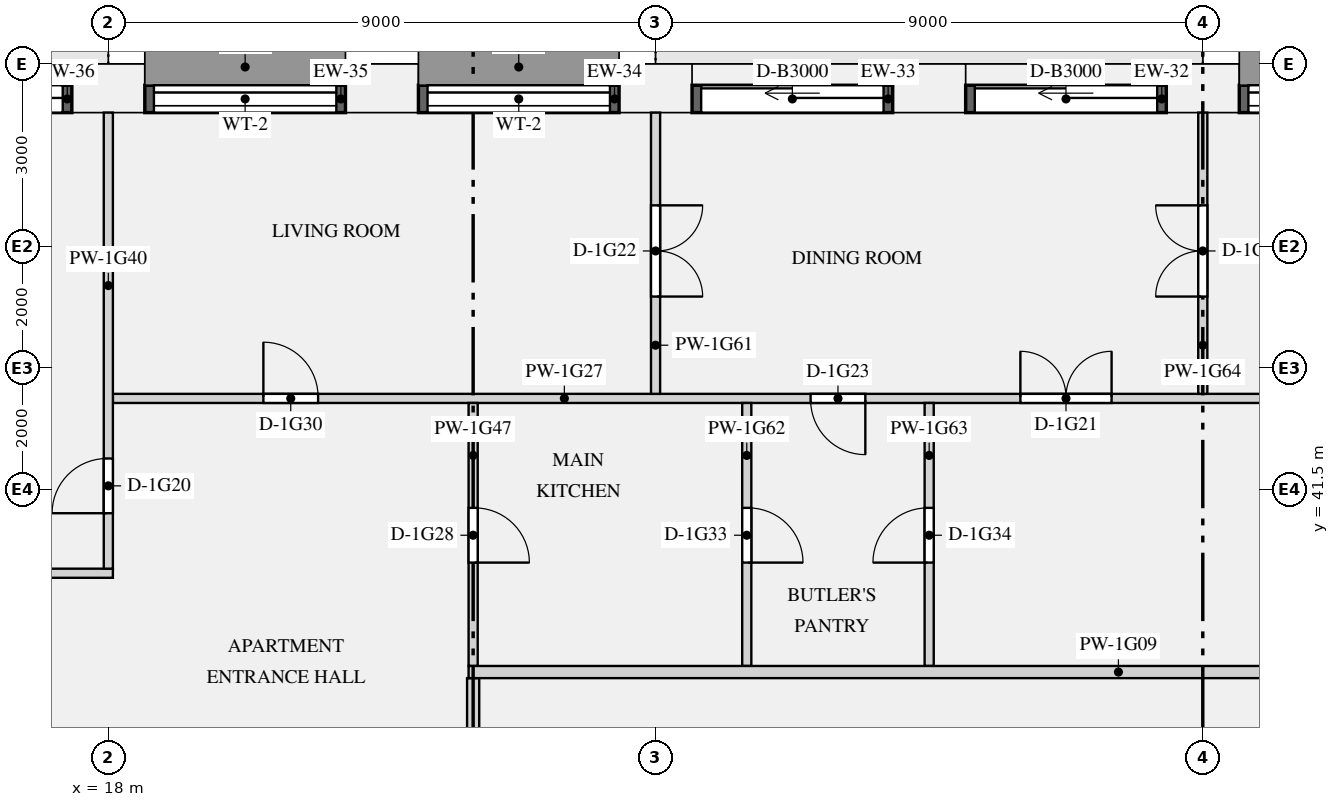
"""IFC4 building model, lengths in metres.
Left out: names, types, materials, properties, quantities, classifications, styles, units other than length and angle.
Written with IfcOpenShell. Run it as: python <this file> out.ifc"""

import sys

from ifc_helpers import new_model, si_unit, direction, frame, frame_2d, origin, origin_2d, place, context, subcontext, project, spatial, rectangle, extrude, element, fill, save


model = new_model("IFC4")
c1 = context("Model", 3, precision=1e-05, world=origin(), true_north=direction((0.0, 1.0)))
c2 = subcontext(c1, "Body", "Model", "MODEL_VIEW")
j1 = project(units=[si_unit("LENGTHUNIT", "METRE"), si_unit("PLANEANGLEUNIT", "RADIAN")], contexts=[c1])
p1 = place(None, origin())
s1 = spatial("IfcSite", under=j1, at=p1, CompositionType="ELEMENT")
p2 = place(p1, origin())
s2 = spatial("IfcBuilding", under=s1, at=p2, CompositionType="ELEMENT")
p3 = place(p2, frame((0.0, 0.0, 69.9)))
s3 = spatial("IfcBuildingStorey", under=s2, at=p3, CompositionType="ELEMENT", Elevation=69.9)
for number, where, z_axis, x_axis in (
    (1, (36.0, 48.1, 0.0), (0.0, 0.0, 1.0), (-1.0, 0.0, 0.0)),
    (2, (31.5, 48.1, 0.0), (0.0, 0.0, 1.0), (-1.0, 0.0, 0.0)),
    (3, (27.0, 48.1, 0.0), (0.0, 0.0, 1.0), (-1.0, 0.0, 0.0)),
    (4, (22.5, 48.1, 0.0), (0.0, 0.0, 1.0), (-1.0, 0.0, 0.0)),
    (5, (18.0, 48.1, 0.0), (0.0, 0.0, 1.0), (-1.0, 0.0, 0.0)),
):
    element("IfcColumn", number, at=place(p3, frame(where, z_axis=z_axis, x_axis=x_axis)), inside=s3, PredefinedType="USERDEFINED", context=c2, shape_type="SweptSolid", body=[
        extrude(rectangle(XDim=1.2, YDim=0.8, at=origin_2d()), origin(), (0.0, 0.0, 1.0), 2.65),
    ])
p4 = place(p3, frame((39.9, 47.925, 0.9), z_axis=(0.0, 0.0, 1.0), x_axis=(-1.0, 0.0, 0.0)))
e6 = element("IfcWall", 6, at=p4, inside=s3, PredefinedType="SOLIDWALL", context=c2, shape_type="SweptSolid", body=[
    extrude(rectangle(XDim=3.3, YDim=0.45, at=frame_2d((1.65, 0.0))), origin(), (0.0, 0.0, 1.0), 1.75),
])
p5 = place(p4, frame((0.15, 0.0, 0.15)))
e7 = element("IfcOpeningElement", 7, at=p5, cuts=e6, PredefinedType="OPENING", context=c2, shape_type="SweptSolid", body=[
    extrude(rectangle(XDim=3.0, YDim=1.5, at=frame_2d((1.5, 0.75))), frame((0.0, 0.235, 0.0), z_axis=(0.0, -1.0, 0.0), x_axis=(1.0, 0.0, 0.0)), (0.0, 0.0, 1.0), 0.47),
])
p6 = place(p3, frame((35.4, 47.925, 0.0), z_axis=(0.0, 0.0, 1.0), x_axis=(-1.0, 0.0, 0.0)))
e8 = element("IfcWall", 8, at=p6, inside=s3, PredefinedType="SOLIDWALL", context=c2, shape_type="SweptSolid", body=[
    extrude(rectangle(XDim=3.3, YDim=0.45, at=frame_2d((1.65, 0.0))), origin(), (0.0, 0.0, 1.0), 2.65),
])
p7 = place(p6, frame((0.15, 0.0, 0.0)))
e9 = element("IfcOpeningElement", 9, at=p7, cuts=e8, PredefinedType="OPENING", context=c2, shape_type="SweptSolid", body=[
    extrude(rectangle(XDim=3.0, YDim=2.3, at=frame_2d((1.5, 1.15))), frame((0.0, 0.235, 0.0), z_axis=(0.0, -1.0, 0.0), x_axis=(1.0, 0.0, 0.0)), (0.0, 0.0, 1.0), 0.47),
])
p8 = place(p3, frame((30.9, 47.925, 0.0), z_axis=(0.0, 0.0, 1.0), x_axis=(-1.0, 0.0, 0.0)))
e10 = element("IfcWall", 10, at=p8, inside=s3, PredefinedType="SOLIDWALL", context=c2, shape_type="SweptSolid", body=[
    extrude(rectangle(XDim=3.3, YDim=0.45, at=frame_2d((1.65, 0.0))), origin(), (0.0, 0.0, 1.0), 2.65),
])
p9 = place(p8, frame((0.15, 0.0, 0.0)))
e11 = element("IfcOpeningElement", 11, at=p9, cuts=e10, PredefinedType="OPENING", context=c2, shape_type="SweptSolid", body=[
    extrude(rectangle(XDim=3.0, YDim=2.3, at=frame_2d((1.5, 1.15))), frame((0.0, 0.235, 0.0), z_axis=(0.0, -1.0, 0.0), x_axis=(1.0, 0.0, 0.0)), (0.0, 0.0, 1.0), 0.47),
])
p10 = place(p3, frame((26.4, 47.925, 0.9), z_axis=(0.0, 0.0, 1.0), x_axis=(-1.0, 0.0, 0.0)))
e12 = element("IfcWall", 12, at=p10, inside=s3, PredefinedType="SOLIDWALL", context=c2, shape_type="SweptSolid", body=[
    extrude(rectangle(XDim=3.3, YDim=0.45, at=frame_2d((1.65, 0.0))), origin(), (0.0, 0.0, 1.0), 1.75),
])
p11 = place(p10, frame((0.15, 0.0, 0.15)))
e13 = element("IfcOpeningElement", 13, at=p11, cuts=e12, PredefinedType="OPENING", context=c2, shape_type="SweptSolid", body=[
    extrude(rectangle(XDim=3.0, YDim=1.5, at=frame_2d((1.5, 0.75))), frame((0.0, 0.235, 0.0), z_axis=(0.0, -1.0, 0.0), x_axis=(1.0, 0.0, 0.0)), (0.0, 0.0, 1.0), 0.47),
])
p12 = place(p3, frame((21.9, 47.925, 0.9), z_axis=(0.0, 0.0, 1.0), x_axis=(-1.0, 0.0, 0.0)))
e14 = element("IfcWall", 14, at=p12, inside=s3, PredefinedType="SOLIDWALL", context=c2, shape_type="SweptSolid", body=[
    extrude(rectangle(XDim=3.3, YDim=0.45, at=frame_2d((1.65, 0.0))), origin(), (0.0, 0.0, 1.0), 1.75),
])
p13 = place(p12, frame((0.15, 0.0, 0.15)))
e15 = element("IfcOpeningElement", 15, at=p13, cuts=e14, PredefinedType="OPENING", context=c2, shape_type="SweptSolid", body=[
    extrude(rectangle(XDim=3.0, YDim=1.5, at=frame_2d((1.5, 0.75))), frame((0.0, 0.235, 0.0), z_axis=(0.0, -1.0, 0.0), x_axis=(1.0, 0.0, 0.0)), (0.0, 0.0, 1.0), 0.47),
])
p14 = place(p3, frame((17.4, 47.925, 0.0), z_axis=(0.0, 0.0, 1.0), x_axis=(-1.0, 0.0, 0.0)))
e16 = element("IfcWall", 16, at=p14, inside=s3, PredefinedType="SOLIDWALL", context=c2, shape_type="SweptSolid", body=[
    extrude(rectangle(XDim=3.3, YDim=0.45, at=frame_2d((1.65, 0.0))), origin(), (0.0, 0.0, 1.0), 2.65),
])
p15 = place(p14, frame((0.15, 0.0, 0.0)))
e17 = element("IfcOpeningElement", 17, at=p15, cuts=e16, PredefinedType="OPENING", context=c2, shape_type="SweptSolid", body=[
    extrude(rectangle(XDim=3.0, YDim=2.3, at=frame_2d((1.5, 1.15))), frame((0.0, 0.235, 0.0), z_axis=(0.0, -1.0, 0.0), x_axis=(1.0, 0.0, 0.0)), (0.0, 0.0, 1.0), 0.47),
])
p16 = place(p3, frame((23.925, 38.5, 0.0), z_axis=(0.0, 0.0, 1.0), x_axis=(1.0, 0.0, 0.0)))
e18 = element("IfcWall", 18, at=p16, inside=s3, PredefinedType="PARTITIONING", context=c2, shape_type="SweptSolid", body=[
    extrude(rectangle(XDim=24.175, YDim=0.2, at=frame_2d((12.087, 0.0))), origin(), (0.0, 0.0, 1.0), 2.65),
])
p17 = place(p16, frame((21.375, 0.0, 0.0)))
e19 = element("IfcOpeningElement", 19, at=p17, cuts=e18, PredefinedType="OPENING", context=c2, shape_type="SweptSolid", body=[
    extrude(rectangle(XDim=1.1, YDim=2.1, at=frame_2d((0.55, 1.05))), frame((0.0, 0.11, 0.0), z_axis=(0.0, -1.0, 0.0), x_axis=(1.0, 0.0, 0.0)), (0.0, 0.0, 1.0), 0.22),
])
p18 = place(p3, frame((13.425, 40.125, 0.0), z_axis=(0.0, 0.0, 1.0), x_axis=(1.0, 0.0, 0.0)))
e20 = element("IfcWall", 20, at=p18, inside=s3, PredefinedType="PARTITIONING", context=c2, shape_type="SweptSolid", body=[
    extrude(rectangle(XDim=4.65, YDim=0.15, at=frame_2d((2.325, 0.0))), origin(), (0.0, 0.0, 1.0), 2.65),
])
p19 = place(p3, frame((18.075, 43.0, 0.0), z_axis=(0.0, 0.0, 1.0), x_axis=(1.0, 0.0, 0.0)))
e21 = element("IfcWall", 21, at=p19, inside=s3, PredefinedType="PARTITIONING", context=c2, shape_type="SweptSolid", body=[
    extrude(rectangle(XDim=26.825, YDim=0.15, at=frame_2d((13.413, 0.0))), origin(), (0.0, 0.0, 1.0), 2.65),
])
p20 = place(p19, frame((14.925, 0.0, 0.0)))
e22 = element("IfcOpeningElement", 22, at=p20, cuts=e21, PredefinedType="OPENING", context=c2, shape_type="SweptSolid", body=[
    extrude(rectangle(XDim=1.5, YDim=2.1, at=frame_2d((0.75, 1.05))), frame((0.0, 0.085, 0.0), z_axis=(0.0, -1.0, 0.0), x_axis=(1.0, 0.0, 0.0)), (0.0, 0.0, 1.0), 0.17),
])
p21 = place(p19, frame((11.475, 0.0, 0.0)))
e23 = element("IfcOpeningElement", 23, at=p21, cuts=e21, PredefinedType="OPENING", context=c2, shape_type="SweptSolid", body=[
    extrude(rectangle(XDim=0.9, YDim=2.1, at=frame_2d((0.45, 1.05))), frame((0.0, 0.085, 0.0), z_axis=(0.0, -1.0, 0.0), x_axis=(1.0, 0.0, 0.0)), (0.0, 0.0, 1.0), 0.17),
])
p22 = place(p19, frame((2.475, 0.0, 0.0)))
e24 = element("IfcOpeningElement", 24, at=p22, cuts=e21, PredefinedType="OPENING", context=c2, shape_type="SweptSolid", body=[
    extrude(rectangle(XDim=0.9, YDim=2.1, at=frame_2d((0.45, 1.05))), frame((0.0, 0.085, 0.0), z_axis=(0.0, -1.0, 0.0), x_axis=(1.0, 0.0, 0.0)), (0.0, 0.0, 1.0), 0.17),
])
p23 = place(p19, frame((21.675, 0.0, 0.0)))
e25 = element("IfcOpeningElement", 25, at=p23, cuts=e21, PredefinedType="OPENING", context=c2, shape_type="SweptSolid", body=[
    extrude(rectangle(XDim=1.5, YDim=2.1, at=frame_2d((0.75, 1.05))), frame((0.0, 0.085, 0.0), z_axis=(0.0, -1.0, 0.0), x_axis=(1.0, 0.0, 0.0)), (0.0, 0.0, 1.0), 0.17),
])
p24 = place(p3, frame((18.0, 40.2, 0.0), z_axis=(0.0, 0.0, 1.0), x_axis=(0.0, 1.0, 0.0)))
e26 = element("IfcWall", 26, at=p24, inside=s3, PredefinedType="PARTITIONING", context=c2, shape_type="SweptSolid", body=[
    extrude(rectangle(XDim=7.5, YDim=0.15, at=frame_2d((3.75, 0.0))), origin(), (0.0, 0.0, 1.0), 2.65),
])
p25 = place(p24, frame((0.912, 0.0, 0.0)))
e27 = element("IfcOpeningElement", 27, at=p25, cuts=e26, PredefinedType="OPENING", context=c2, shape_type="SweptSolid", body=[
    extrude(rectangle(XDim=0.9, YDim=2.1, at=frame_2d((0.45, 1.05))), frame((0.0, 0.085, 0.0), z_axis=(0.0, -1.0, 0.0), x_axis=(1.0, 0.0, 0.0)), (0.0, 0.0, 1.0), 0.17),
])
p26 = place(p3, frame((24.0, 38.6, 0.0), z_axis=(0.0, 0.0, 1.0), x_axis=(0.0, 1.0, 0.0)))
e28 = element("IfcWall", 28, at=p26, inside=s3, PredefinedType="PARTITIONING", context=c2, shape_type="SweptSolid", body=[
    extrude(rectangle(XDim=4.325, YDim=0.15, at=frame_2d((2.163, 0.0))), origin(), (0.0, 0.0, 1.0), 2.65),
])
p27 = place(p26, frame((1.7, 0.0, 0.0)))
e29 = element("IfcOpeningElement", 29, at=p27, cuts=e28, PredefinedType="OPENING", context=c2, shape_type="SweptSolid", body=[
    extrude(rectangle(XDim=0.9, YDim=2.1, at=frame_2d((0.45, 1.05))), frame((0.0, 0.085, 0.0), z_axis=(0.0, -1.0, 0.0), x_axis=(1.0, 0.0, 0.0)), (0.0, 0.0, 1.0), 0.17),
])
p28 = place(p3, frame((24.0, 27.1, 0.0), z_axis=(0.0, 0.0, 1.0), x_axis=(0.0, 1.0, 0.0)))
e30 = element("IfcWall", 30, at=p28, inside=s3, PredefinedType="PARTITIONING", context=c2, shape_type="SweptSolid", body=[
    extrude(rectangle(XDim=11.3, YDim=0.2, at=frame_2d((5.65, 0.0))), origin(), (0.0, 0.0, 1.0), 2.65),
])
p29 = place(p28, frame((5.35, 0.0, 0.0)))
e31 = element("IfcOpeningElement", 31, at=p29, cuts=e30, PredefinedType="OPENING", context=c2, shape_type="SweptSolid", body=[
    extrude(rectangle(XDim=1.1, YDim=2.1, at=frame_2d((0.55, 1.05))), frame((0.0, 0.11, 0.0), z_axis=(0.0, -1.0, 0.0), x_axis=(1.0, 0.0, 0.0)), (0.0, 0.0, 1.0), 0.22),
])
p30 = place(p3, frame((27.0, 43.075, 0.0), z_axis=(0.0, 0.0, 1.0), x_axis=(0.0, 1.0, 0.0)))
e32 = element("IfcWall", 32, at=p30, inside=s3, PredefinedType="PARTITIONING", context=c2, shape_type="SweptSolid", body=[
    extrude(rectangle(XDim=4.625, YDim=0.15, at=frame_2d((2.312, 0.0))), origin(), (0.0, 0.0, 1.0), 2.65),
])
p31 = place(p30, frame((1.6, 0.0, 0.0)))
e33 = element("IfcOpeningElement", 33, at=p31, cuts=e32, PredefinedType="OPENING", context=c2, shape_type="SweptSolid", body=[
    extrude(rectangle(XDim=1.5, YDim=2.1, at=frame_2d((0.75, 1.05))), frame((0.0, 0.085, 0.0), z_axis=(0.0, -1.0, 0.0), x_axis=(1.0, 0.0, 0.0)), (0.0, 0.0, 1.0), 0.17),
])
p32 = place(p3, frame((28.5, 38.6, 0.0), z_axis=(0.0, 0.0, 1.0), x_axis=(0.0, 1.0, 0.0)))
e34 = element("IfcWall", 34, at=p32, inside=s3, PredefinedType="PARTITIONING", context=c2, shape_type="SweptSolid", body=[
    extrude(rectangle(XDim=4.325, YDim=0.15, at=frame_2d((2.163, 0.0))), origin(), (0.0, 0.0, 1.0), 2.65),
])
p33 = place(p32, frame((1.7, 0.0, 0.0)))
e35 = element("IfcOpeningElement", 35, at=p33, cuts=e34, PredefinedType="OPENING", context=c2, shape_type="SweptSolid", body=[
    extrude(rectangle(XDim=0.9, YDim=2.1, at=frame_2d((0.45, 1.05))), frame((0.0, 0.085, 0.0), z_axis=(0.0, -1.0, 0.0), x_axis=(1.0, 0.0, 0.0)), (0.0, 0.0, 1.0), 0.17),
])
p34 = place(p3, frame((31.5, 38.6, 0.0), z_axis=(0.0, 0.0, 1.0), x_axis=(0.0, 1.0, 0.0)))
e36 = element("IfcWall", 36, at=p34, inside=s3, PredefinedType="PARTITIONING", context=c2, shape_type="SweptSolid", body=[
    extrude(rectangle(XDim=4.325, YDim=0.15, at=frame_2d((2.163, 0.0))), origin(), (0.0, 0.0, 1.0), 2.65),
])
p35 = place(p34, frame((1.7, 0.0, 0.0)))
e37 = element("IfcOpeningElement", 37, at=p35, cuts=e36, PredefinedType="OPENING", context=c2, shape_type="SweptSolid", body=[
    extrude(rectangle(XDim=0.9, YDim=2.1, at=frame_2d((0.45, 1.05))), frame((0.0, 0.085, 0.0), z_axis=(0.0, -1.0, 0.0), x_axis=(1.0, 0.0, 0.0)), (0.0, 0.0, 1.0), 0.17),
])
p36 = place(p3, frame((36.0, 43.075, 0.0), z_axis=(0.0, 0.0, 1.0), x_axis=(0.0, 1.0, 0.0)))
e38 = element("IfcWall", 38, at=p36, inside=s3, PredefinedType="PARTITIONING", context=c2, shape_type="SweptSolid", body=[
    extrude(rectangle(XDim=4.625, YDim=0.15, at=frame_2d((2.312, 0.0))), origin(), (0.0, 0.0, 1.0), 2.65),
])
p37 = place(p36, frame((1.6, 0.0, 0.0)))
e39 = element("IfcOpeningElement", 39, at=p37, cuts=e38, PredefinedType="OPENING", context=c2, shape_type="SweptSolid", body=[
    extrude(rectangle(XDim=1.5, YDim=2.1, at=frame_2d((0.75, 1.05))), frame((0.0, 0.085, 0.0), z_axis=(0.0, -1.0, 0.0), x_axis=(1.0, 0.0, 0.0)), (0.0, 0.0, 1.0), 0.17),
])
p38 = place(p5, origin())
e40 = element("IfcWindow", 40, at=p38, inside=s3, PartitioningType="SINGLE_PANEL", PredefinedType="WINDOW", context=c2, shape_type="SweptSolid", body=[
    extrude(rectangle(XDim=3.0, YDim=1.5, at=frame_2d((1.5, 0.75))), frame((0.0, -0.065, 0.0), z_axis=(0.0, -1.0, 0.0), x_axis=(1.0, 0.0, 0.0)), (0.0, 0.0, 1.0), 0.06),
])
fill(e7, e40)
p39 = place(p7, origin())
e41 = element("IfcDoor", 41, at=p39, inside=s3, OperationType="SLIDING_TO_LEFT", PredefinedType="DOOR", context=c2, shape_type="SweptSolid", body=[
    extrude(rectangle(XDim=3.0, YDim=2.3, at=frame_2d((1.5, 1.15))), frame((0.0, -0.07, 0.0), z_axis=(0.0, -1.0, 0.0), x_axis=(1.0, 0.0, 0.0)), (0.0, 0.0, 1.0), 0.05),
])
fill(e9, e41)
p40 = place(p9, origin())
e42 = element("IfcDoor", 42, at=p40, inside=s3, OperationType="SLIDING_TO_LEFT", PredefinedType="DOOR", context=c2, shape_type="SweptSolid", body=[
    extrude(rectangle(XDim=3.0, YDim=2.3, at=frame_2d((1.5, 1.15))), frame((0.0, -0.07, 0.0), z_axis=(0.0, -1.0, 0.0), x_axis=(1.0, 0.0, 0.0)), (0.0, 0.0, 1.0), 0.05),
])
fill(e11, e42)
p41 = place(p11, origin())
e43 = element("IfcWindow", 43, at=p41, inside=s3, PartitioningType="SINGLE_PANEL", PredefinedType="WINDOW", context=c2, shape_type="SweptSolid", body=[
    extrude(rectangle(XDim=3.0, YDim=1.5, at=frame_2d((1.5, 0.75))), frame((0.0, -0.065, 0.0), z_axis=(0.0, -1.0, 0.0), x_axis=(1.0, 0.0, 0.0)), (0.0, 0.0, 1.0), 0.06),
])
fill(e13, e43)
p42 = place(p13, origin())
e44 = element("IfcWindow", 44, at=p42, inside=s3, PartitioningType="SINGLE_PANEL", PredefinedType="WINDOW", context=c2, shape_type="SweptSolid", body=[
    extrude(rectangle(XDim=3.0, YDim=1.5, at=frame_2d((1.5, 0.75))), frame((0.0, -0.065, 0.0), z_axis=(0.0, -1.0, 0.0), x_axis=(1.0, 0.0, 0.0)), (0.0, 0.0, 1.0), 0.06),
])
fill(e15, e44)
p43 = place(p15, origin())
e45 = element("IfcDoor", 45, at=p43, inside=s3, OperationType="SLIDING_TO_LEFT", PredefinedType="DOOR", context=c2, shape_type="SweptSolid", body=[
    extrude(rectangle(XDim=3.0, YDim=2.3, at=frame_2d((1.5, 1.15))), frame((0.0, -0.07, 0.0), z_axis=(0.0, -1.0, 0.0), x_axis=(1.0, 0.0, 0.0)), (0.0, 0.0, 1.0), 0.05),
])
fill(e17, e45)
p44 = place(p25, origin())
e46 = element("IfcDoor", 46, at=p44, inside=s3, OperationType="SINGLE_SWING_LEFT", PredefinedType="DOOR", context=c2, shape_type="SweptSolid", body=[
    extrude(rectangle(XDim=0.9, YDim=2.1, at=frame_2d((0.45, 1.05))), frame((0.0, 0.025, 0.0), z_axis=(0.0, -1.0, 0.0), x_axis=(1.0, 0.0, 0.0)), (0.0, 0.0, 1.0), 0.05),
])
fill(e27, e46)
p45 = place(p20, origin())
e47 = element("IfcDoor", 47, at=p45, inside=s3, OperationType="DOUBLE_DOOR_SINGLE_SWING", PredefinedType="DOOR", context=c2, shape_type="SweptSolid", body=[
    extrude(rectangle(XDim=1.5, YDim=2.1, at=frame_2d((0.75, 1.05))), frame((0.0, 0.025, 0.0), z_axis=(0.0, -1.0, 0.0), x_axis=(1.0, 0.0, 0.0)), (0.0, 0.0, 1.0), 0.05),
])
fill(e22, e47)
p46 = place(p31, frame((1.5, 0.0, 0.0), z_axis=(0.0, 0.0, 1.0), x_axis=(-1.0, 0.0, 0.0)))
e48 = element("IfcDoor", 48, at=p46, inside=s3, OperationType="DOUBLE_DOOR_SINGLE_SWING", PredefinedType="DOOR", context=c2, shape_type="SweptSolid", body=[
    extrude(rectangle(XDim=1.5, YDim=2.1, at=frame_2d((0.75, 1.05))), frame((0.0, 0.025, 0.0), z_axis=(0.0, -1.0, 0.0), x_axis=(1.0, 0.0, 0.0)), (0.0, 0.0, 1.0), 0.05),
])
fill(e33, e48)
p47 = place(p21, frame((0.9, 0.0, 0.0), z_axis=(0.0, 0.0, 1.0), x_axis=(-1.0, 0.0, 0.0)))
e49 = element("IfcDoor", 49, at=p47, inside=s3, OperationType="SINGLE_SWING_LEFT", PredefinedType="DOOR", context=c2, shape_type="SweptSolid", body=[
    extrude(rectangle(XDim=0.9, YDim=2.1, at=frame_2d((0.45, 1.05))), frame((0.0, 0.025, 0.0), z_axis=(0.0, -1.0, 0.0), x_axis=(1.0, 0.0, 0.0)), (0.0, 0.0, 1.0), 0.05),
])
fill(e23, e49)
p48 = place(p37, origin())
e50 = element("IfcDoor", 50, at=p48, inside=s3, OperationType="DOUBLE_DOOR_SINGLE_SWING", PredefinedType="DOOR", context=c2, shape_type="SweptSolid", body=[
    extrude(rectangle(XDim=1.5, YDim=2.1, at=frame_2d((0.75, 1.05))), frame((0.0, 0.025, 0.0), z_axis=(0.0, -1.0, 0.0), x_axis=(1.0, 0.0, 0.0)), (0.0, 0.0, 1.0), 0.05),
])
fill(e39, e50)
p49 = place(p27, frame((0.9, 0.0, 0.0), z_axis=(0.0, 0.0, 1.0), x_axis=(-1.0, 0.0, 0.0)))
e51 = element("IfcDoor", 51, at=p49, inside=s3, OperationType="SINGLE_SWING_RIGHT", PredefinedType="DOOR", context=c2, shape_type="SweptSolid", body=[
    extrude(rectangle(XDim=0.9, YDim=2.1, at=frame_2d((0.45, 1.05))), frame((0.0, 0.025, 0.0), z_axis=(0.0, -1.0, 0.0), x_axis=(1.0, 0.0, 0.0)), (0.0, 0.0, 1.0), 0.05),
])
fill(e29, e51)
p50 = place(p22, origin())
e52 = element("IfcDoor", 52, at=p50, inside=s3, OperationType="SINGLE_SWING_LEFT", PredefinedType="DOOR", context=c2, shape_type="SweptSolid", body=[
    extrude(rectangle(XDim=0.9, YDim=2.1, at=frame_2d((0.45, 1.05))), frame((0.0, 0.025, 0.0), z_axis=(0.0, -1.0, 0.0), x_axis=(1.0, 0.0, 0.0)), (0.0, 0.0, 1.0), 0.05),
])
fill(e24, e52)
p51 = place(p33, frame((0.9, 0.0, 0.0), z_axis=(0.0, 0.0, 1.0), x_axis=(-1.0, 0.0, 0.0)))
e53 = element("IfcDoor", 53, at=p51, inside=s3, OperationType="SINGLE_SWING_RIGHT", PredefinedType="DOOR", context=c2, shape_type="SweptSolid", body=[
    extrude(rectangle(XDim=0.9, YDim=2.1, at=frame_2d((0.45, 1.05))), frame((0.0, 0.025, 0.0), z_axis=(0.0, -1.0, 0.0), x_axis=(1.0, 0.0, 0.0)), (0.0, 0.0, 1.0), 0.05),
])
fill(e35, e53)
p52 = place(p35, origin())
e54 = element("IfcDoor", 54, at=p52, inside=s3, OperationType="SINGLE_SWING_LEFT", PredefinedType="DOOR", context=c2, shape_type="SweptSolid", body=[
    extrude(rectangle(XDim=0.9, YDim=2.1, at=frame_2d((0.45, 1.05))), frame((0.0, 0.025, 0.0), z_axis=(0.0, -1.0, 0.0), x_axis=(1.0, 0.0, 0.0)), (0.0, 0.0, 1.0), 0.05),
])
fill(e37, e54)
save(model, sys.argv[1])
